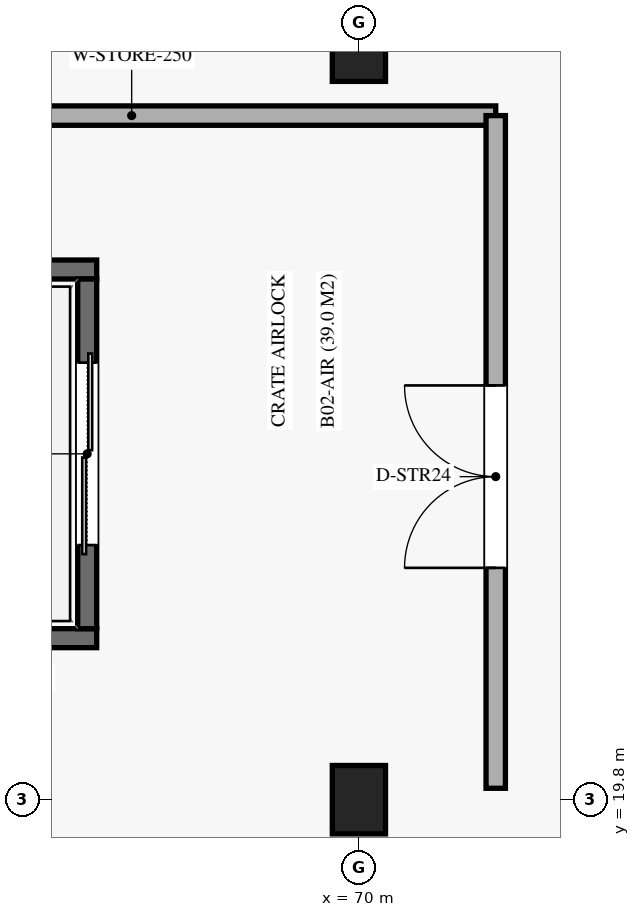
"""IFC4 building model, lengths in metres.
Left out: names, types, materials, properties, quantities, classifications, styles, units other than length and angle.
Written with IfcOpenShell. Run it as: python <this file> out.ifc"""

import sys

from ifc_helpers import new_model, si_unit, direction, frame, frame_2d, origin, origin_2d, place, context, subcontext, project, spatial, rectangle, extrude, element, fill, save


model = new_model("IFC4")
c1 = context("Model", 3, precision=1e-05, world=origin(), true_north=direction((0.0, 1.0)))
c2 = subcontext(c1, "Body", "Model", "MODEL_VIEW")
j1 = project(units=[si_unit("LENGTHUNIT", "METRE"), si_unit("PLANEANGLEUNIT", "RADIAN")], contexts=[c1])
p1 = place(None, origin())
s1 = spatial("IfcSite", under=j1, at=p1, CompositionType="ELEMENT")
p2 = place(p1, origin())
s2 = spatial("IfcBuilding", under=s1, at=p2, CompositionType="ELEMENT")
p3 = place(p2, frame((0.0, 0.0, -9.18)))
s3 = spatial("IfcBuildingStorey", under=s2, at=p3, CompositionType="ELEMENT", Elevation=-9.18)
for number, where, z_axis, x_axis in (
    (1, (70.0, 19.8, 0.0), (0.0, 0.0, 1.0), (1.0, 0.0, 0.0)),
    (2, (70.0, 29.7, 0.0), (0.0, 0.0, 1.0), (1.0, 0.0, 0.0)),
):
    element("IfcColumn", number, at=place(p3, frame(where, z_axis=z_axis, x_axis=x_axis)), inside=s3, PredefinedType="COLUMN", context=c2, shape_type="SweptSolid", body=[
        extrude(rectangle(XDim=0.7, YDim=0.9, at=origin_2d()), origin(), (0.0, 0.0, 1.0), 4.59),
    ])
for number, where, z_axis, x_axis in (
    (3, (62.22, 21.925, 0.0), (0.0, 0.0, 1.0), (1.0, 0.0, 0.0)),
    (4, (62.22, 26.775, 0.0), (0.0, 0.0, 1.0), (1.0, 0.0, 0.0)),
):
    element("IfcWall", number, at=place(p3, frame(where, z_axis=z_axis, x_axis=x_axis)), inside=s3, PredefinedType="SOLIDWALL", context=c2, shape_type="SweptSolid", body=[
        extrude(rectangle(XDim=4.33, YDim=0.25, at=frame_2d((2.165, 0.0))), origin(), (0.0, 0.0, 1.0), 4.29),
    ])
p4 = place(p3, frame((66.425, 22.05, 0.0), z_axis=(0.0, 0.0, 1.0), x_axis=(0.0, 1.0, 0.0)))
e5 = element("IfcWall", 5, at=p4, inside=s3, PredefinedType="SOLIDWALL", context=c2, shape_type="SweptSolid", body=[
    extrude(rectangle(XDim=4.6, YDim=0.25, at=frame_2d((2.3, 0.0))), origin(), (0.0, 0.0, 1.0), 4.29),
])
p5 = place(p4, frame((1.1, 0.0, 0.0)))
e6 = element("IfcOpeningElement", 6, at=p5, cuts=e5, PredefinedType="OPENING", context=c2, shape_type="SweptSolid", body=[
    extrude(rectangle(XDim=2.4, YDim=2.65, at=frame_2d((1.2, 1.325))), frame((0.0, 0.135, 0.0), z_axis=(0.0, -1.0, 0.0), x_axis=(1.0, 0.0, 0.0)), (0.0, 0.0, 1.0), 0.27),
])
p6 = place(p3, frame((62.22, 28.8, 0.0), z_axis=(0.0, 0.0, 1.0), x_axis=(1.0, 0.0, 0.0)))
e7 = element("IfcWall", 7, at=p6, inside=s3, PredefinedType="SOLIDWALL", context=c2, shape_type="SweptSolid", body=[
    extrude(rectangle(XDim=9.58, YDim=0.255, at=frame_2d((4.79, 0.0))), origin(), (0.0, 0.0, 1.0), 3.43),
])
p7 = place(p3, frame((71.8, 19.95, 0.0), z_axis=(0.0, 0.0, 1.0), x_axis=(0.0, 1.0, 0.0)))
e8 = element("IfcWall", 8, at=p7, inside=s3, PredefinedType="SOLIDWALL", context=c2, shape_type="SweptSolid", body=[
    extrude(rectangle(XDim=8.85, YDim=0.255, at=frame_2d((4.425, 0.0))), origin(), (0.0, 0.0, 1.0), 3.43),
])
p8 = place(p7, frame((2.9, 0.0, 0.0)))
e9 = element("IfcOpeningElement", 9, at=p8, cuts=e8, PredefinedType="OPENING", context=c2, shape_type="SweptSolid", body=[
    extrude(rectangle(XDim=2.4, YDim=2.5, at=frame_2d((1.2, 1.25))), frame((0.0, 0.137, 0.0), z_axis=(0.0, -1.0, 0.0), x_axis=(1.0, 0.0, 0.0)), (0.0, 0.0, 1.0), 0.275),
])
p9 = place(p5, origin())
e10 = element("IfcDoor", 10, at=p9, inside=s3, OperationType="DOUBLE_DOOR_SLIDING", PredefinedType="DOOR", context=c2, shape_type="SweptSolid", body=[
    extrude(rectangle(XDim=2.4, YDim=2.65, at=frame_2d((1.2, 1.325))), frame((0.0, 0.025, 0.0), z_axis=(0.0, -1.0, 0.0), x_axis=(1.0, 0.0, 0.0)), (0.0, 0.0, 1.0), 0.05),
])
fill(e6, e10)
p10 = place(p8, origin())
e11 = element("IfcDoor", 11, at=p10, inside=s3, OperationType="DOUBLE_DOOR_SINGLE_SWING", PredefinedType="DOOR", context=c2, shape_type="SweptSolid", body=[
    extrude(rectangle(XDim=2.4, YDim=2.5, at=frame_2d((1.2, 1.25))), frame((0.0, 0.025, 0.0), z_axis=(0.0, -1.0, 0.0), x_axis=(1.0, 0.0, 0.0)), (0.0, 0.0, 1.0), 0.05),
])
fill(e9, e11)
save(model, sys.argv[1])
